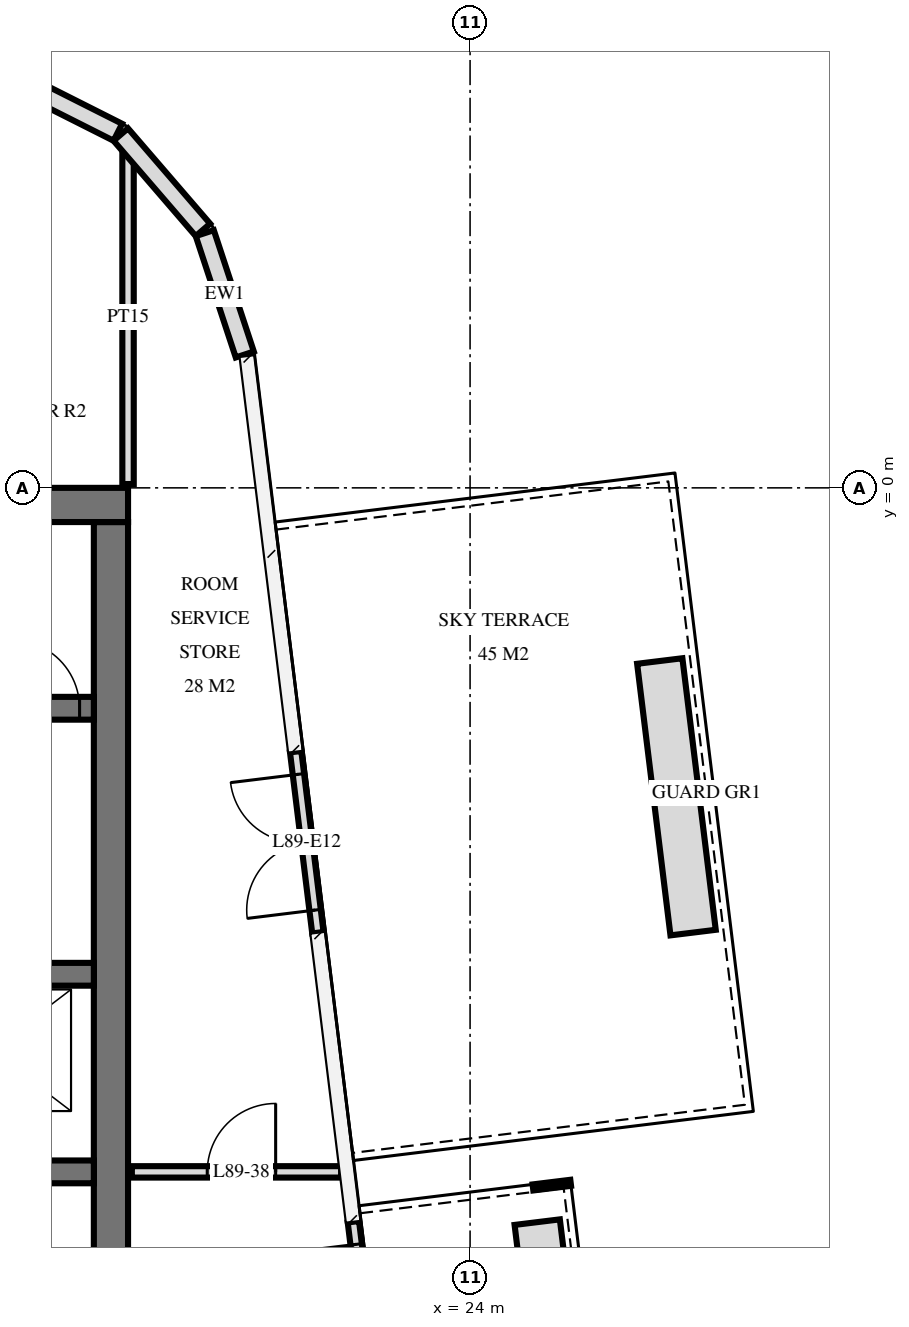
"""IFC4 building model, lengths in metres.
Left out: names, types, materials, properties, quantities, classifications, styles, units other than length and angle.
Written with IfcOpenShell. Run it as: python <this file> out.ifc"""

import sys

from ifc_helpers import new_model, si_unit, direction, frame, frame_2d, origin, place, context, subcontext, project, spatial, rectangle, extrude, element, fill, save


model = new_model("IFC4")
c1 = context("Model", 3, precision=1e-05, world=origin(), true_north=direction((0.0, 1.0)))
c2 = subcontext(c1, "Body", "Model", "MODEL_VIEW")
j1 = project(units=[si_unit("LENGTHUNIT", "METRE"), si_unit("PLANEANGLEUNIT", "RADIAN")], contexts=[c1])
p1 = place(None, origin())
s1 = spatial("IfcSite", under=j1, at=p1, CompositionType="ELEMENT")
p2 = place(p1, origin())
s2 = spatial("IfcBuilding", under=s1, at=p2, CompositionType="ELEMENT")
p3 = place(p2, frame((0.0, 0.0, 338.6)))
s3 = spatial("IfcBuildingStorey", under=s2, at=p3, CompositionType="ELEMENT", Elevation=338.6)
p4 = place(p3, frame((10.0, -0.225, 0.0), z_axis=(0.0, 0.0, 1.0), x_axis=(1.0, 0.0, 0.0)))
e1 = element("IfcWall", 1, at=p4, inside=s3, PredefinedType="SHEAR", context=c2, shape_type="SweptSolid", body=[
    extrude(rectangle(XDim=9.5, YDim=0.45, at=frame_2d((4.75, 0.0))), origin(), (0.0, 0.0, 1.0), 4.0),
])
p5 = place(p3, frame((19.275, -14.55, 0.0), z_axis=(0.0, 0.0, 1.0), x_axis=(0.0, 1.0, 0.0)))
e2 = element("IfcWall", 2, at=p5, inside=s3, PredefinedType="SHEAR", context=c2, shape_type="SweptSolid", body=[
    extrude(rectangle(XDim=14.1, YDim=0.45, at=frame_2d((7.05, 0.0))), origin(), (0.0, 0.0, 1.0), 4.0),
])
p6 = place(p3, frame((10.35, -2.9, 0.0), z_axis=(0.0, 0.0, 1.0), x_axis=(1.0, 0.0, 0.0)))
e3 = element("IfcWall", 3, at=p6, inside=s3, PredefinedType="SHEAR", context=c2, shape_type="SweptSolid", body=[
    extrude(rectangle(XDim=8.7, YDim=0.3, at=frame_2d((4.35, 0.0))), origin(), (0.0, 0.0, 1.0), 4.0),
])
p7 = place(p6, frame((0.8, 0.0, 0.0)))
e4 = element("IfcOpeningElement", 4, at=p7, cuts=e3, PredefinedType="OPENING", context=c2, shape_type="SweptSolid", body=[
    extrude(rectangle(XDim=1.1, YDim=2.1, at=frame_2d((0.55, 1.05))), frame((0.0, 0.16, 0.0), z_axis=(0.0, -1.0, 0.0), x_axis=(1.0, 0.0, 0.0)), (0.0, 0.0, 1.0), 0.32),
])
p8 = place(p6, frame((3.8, 0.0, 0.0)))
e5 = element("IfcOpeningElement", 5, at=p8, cuts=e3, PredefinedType="OPENING", context=c2, shape_type="SweptSolid", body=[
    extrude(rectangle(XDim=1.1, YDim=2.1, at=frame_2d((0.55, 1.05))), frame((0.0, 0.16, 0.0), z_axis=(0.0, -1.0, 0.0), x_axis=(1.0, 0.0, 0.0)), (0.0, 0.0, 1.0), 0.32),
])
p9 = place(p6, frame((6.188, 0.0, 0.0)))
e6 = element("IfcOpeningElement", 6, at=p9, cuts=e3, PredefinedType="OPENING", context=c2, shape_type="SweptSolid", body=[
    extrude(rectangle(XDim=0.9, YDim=2.1, at=frame_2d((0.45, 1.05))), frame((0.0, 0.16, 0.0), z_axis=(0.0, -1.0, 0.0), x_axis=(1.0, 0.0, 0.0)), (0.0, 0.0, 1.0), 0.32),
])
p10 = place(p6, frame((7.613, 0.0, 0.0)))
e7 = element("IfcOpeningElement", 7, at=p10, cuts=e3, PredefinedType="OPENING", context=c2, shape_type="SweptSolid", body=[
    extrude(rectangle(XDim=0.9, YDim=2.1, at=frame_2d((0.45, 1.05))), frame((0.0, 0.16, 0.0), z_axis=(0.0, -1.0, 0.0), x_axis=(1.0, 0.0, 0.0)), (0.0, 0.0, 1.0), 0.32),
])
p11 = place(p3, frame((10.35, -6.4, 0.0), z_axis=(0.0, 0.0, 1.0), x_axis=(1.0, 0.0, 0.0)))
e8 = element("IfcWall", 8, at=p11, inside=s3, PredefinedType="SHEAR", context=c2, shape_type="SweptSolid", body=[
    extrude(rectangle(XDim=8.7, YDim=0.3, at=frame_2d((4.35, 0.0))), origin(), (0.0, 0.0, 1.0), 4.0),
])
p12 = place(p11, frame((0.8, 0.0, 0.0)))
e9 = element("IfcOpeningElement", 9, at=p12, cuts=e8, PredefinedType="OPENING", context=c2, shape_type="SweptSolid", body=[
    extrude(rectangle(XDim=1.1, YDim=2.1, at=frame_2d((0.55, 1.05))), frame((0.0, 0.16, 0.0), z_axis=(0.0, -1.0, 0.0), x_axis=(1.0, 0.0, 0.0)), (0.0, 0.0, 1.0), 0.32),
])
p13 = place(p11, frame((6.8, 0.0, 0.0)))
e10 = element("IfcOpeningElement", 10, at=p13, cuts=e8, PredefinedType="OPENING", context=c2, shape_type="SweptSolid", body=[
    extrude(rectangle(XDim=1.1, YDim=2.1, at=frame_2d((0.55, 1.05))), frame((0.0, 0.16, 0.0), z_axis=(0.0, -1.0, 0.0), x_axis=(1.0, 0.0, 0.0)), (0.0, 0.0, 1.0), 0.32),
])
p14 = place(p3, frame((10.35, -9.0, 0.0), z_axis=(0.0, 0.0, 1.0), x_axis=(1.0, 0.0, 0.0)))
e11 = element("IfcWall", 11, at=p14, inside=s3, PredefinedType="SHEAR", context=c2, shape_type="SweptSolid", body=[
    extrude(rectangle(XDim=8.7, YDim=0.3, at=frame_2d((4.35, 0.0))), origin(), (0.0, 0.0, 1.0), 4.0),
])
p15 = place(p14, frame((3.8, 0.0, 0.0)))
e12 = element("IfcOpeningElement", 12, at=p15, cuts=e11, PredefinedType="OPENING", context=c2, shape_type="SweptSolid", body=[
    extrude(rectangle(XDim=1.1, YDim=2.1, at=frame_2d((0.55, 1.05))), frame((0.0, 0.16, 0.0), z_axis=(0.0, -1.0, 0.0), x_axis=(1.0, 0.0, 0.0)), (0.0, 0.0, 1.0), 0.32),
])
p16 = place(p3, frame((21.036, 1.755, 0.0), z_axis=(0.0, 0.0, 1.0), x_axis=(-0.313046160822, 0.949737911844, 0.0)))
e13 = element("IfcWall", 13, at=p16, inside=s3, PredefinedType="SOLIDWALL", context=c2, shape_type="SweptSolid", body=[
    extrude(rectangle(XDim=1.681, YDim=0.25, at=frame_2d((0.841, 0.0))), origin(), (0.0, 0.0, 1.0), 3.72),
])
for number, where, z_axis, x_axis in (
    (14, (20.485, 3.394, 0.0), (0.0, 0.0, 1.0), (-0.653, 0.758, 0.0)),
    (15, (19.366, 4.679, 0.0), (0.0, 0.0, 1.0), (-0.893, 0.45, 0.0)),
):
    element("IfcWall", number, at=place(p3, frame(where, z_axis=z_axis, x_axis=x_axis)), inside=s3, PredefinedType="SOLIDWALL", context=c2, shape_type="SweptSolid", body=[
        extrude(rectangle(XDim=1.656, YDim=0.25, at=frame_2d((0.828, 0.0))), origin(), (0.0, 0.0, 1.0), 3.72),
    ])
p17 = place(p3, frame((22.757, -12.038, 0.0), z_axis=(0.0, 0.0, 1.0), x_axis=(-0.121868445399, 0.992546261902, 0.0)))
e16 = element("IfcWall", 16, at=p17, inside=s3, PredefinedType="USERDEFINED", context=c2, shape_type="SweptSolid", body=[
    extrude(rectangle(XDim=2.4, YDim=0.15, at=frame_2d((1.2, 0.0))), origin(), (0.0, 0.0, 1.0), 3.72),
])
p18 = place(p17, frame((0.3, 0.0, 0.0)))
e17 = element("IfcOpeningElement", 17, at=p18, cuts=e16, PredefinedType="OPENING", context=c2, shape_type="SweptSolid", body=[
    extrude(rectangle(XDim=1.8, YDim=2.4, at=frame_2d((0.9, 1.2))), frame((0.0, 0.085, 0.0), z_axis=(0.0, -1.0, 0.0), x_axis=(1.0, 0.0, 0.0)), (0.0, 0.0, 1.0), 0.17),
])
p19 = place(p3, frame((21.998, -5.853, 0.0), z_axis=(0.0, 0.0, 1.0), x_axis=(-0.121868445399, 0.992546261902, 0.0)))
e18 = element("IfcWall", 18, at=p19, inside=s3, PredefinedType="USERDEFINED", context=c2, shape_type="SweptSolid", body=[
    extrude(rectangle(XDim=2.4, YDim=0.15, at=frame_2d((1.2, 0.0))), origin(), (0.0, 0.0, 1.0), 3.72),
])
p20 = place(p19, frame((0.3, 0.0, 0.0)))
e19 = element("IfcOpeningElement", 19, at=p20, cuts=e18, PredefinedType="OPENING", context=c2, shape_type="SweptSolid", body=[
    extrude(rectangle(XDim=1.8, YDim=2.4, at=frame_2d((0.9, 1.2))), frame((0.0, 0.085, 0.0), z_axis=(0.0, -1.0, 0.0), x_axis=(1.0, 0.0, 0.0)), (0.0, 0.0, 1.0), 0.17),
])
p21 = place(p3, frame((24.883, -9.662, 0.0), z_axis=(0.0, 0.0, 1.0), x_axis=(0.121830336845, -0.992550940267, 0.0)))
e20 = element("IfcWall", 20, at=p21, inside=s3, PredefinedType="USERDEFINED", context=c2, shape_type="SweptSolid", body=[
    extrude(rectangle(XDim=1.8, YDim=0.6, at=frame_2d((0.9, 0.0))), origin(), (0.0, 0.0, 1.0), 0.65),
])
p22 = place(p3, frame((26.496, -2.278, 0.0), z_axis=(0.0, 0.0, 1.0), x_axis=(0.121864343918, -0.992546765488, 0.0)))
e21 = element("IfcWall", 21, at=p22, inside=s3, PredefinedType="USERDEFINED", context=c2, shape_type="SweptSolid", body=[
    extrude(rectangle(XDim=3.6, YDim=0.6, at=frame_2d((1.8, 0.0))), origin(), (0.0, 0.0, 1.0), 0.65),
])
p23 = place(p3, frame((19.5, 0.05, 0.0), z_axis=(0.0, 0.0, 1.0), x_axis=(0.0, 1.0, 0.0)))
e22 = element("IfcWall", 22, at=p23, inside=s3, PredefinedType="PARTITIONING", context=c2, shape_type="SweptSolid", body=[
    extrude(rectangle(XDim=4.403, YDim=0.15, at=frame_2d((2.202, 0.0))), origin(), (0.0, 0.0, 1.0), 3.72),
])
p24 = place(p3, frame((19.55, -9.0, 0.0), z_axis=(0.0, 0.0, 1.0), x_axis=(1.0, 0.0, 0.0)))
e23 = element("IfcWall", 23, at=p24, inside=s3, PredefinedType="PARTITIONING", context=c2, shape_type="SweptSolid", body=[
    extrude(rectangle(XDim=2.753, YDim=0.15, at=frame_2d((1.377, 0.0))), origin(), (0.0, 0.0, 1.0), 3.72),
])
p25 = place(p24, frame((0.992, 0.0, 0.0)))
e24 = element("IfcOpeningElement", 24, at=p25, cuts=e23, PredefinedType="OPENING", context=c2, shape_type="SweptSolid", body=[
    extrude(rectangle(XDim=0.9, YDim=2.1, at=frame_2d((0.45, 1.05))), frame((0.0, 0.085, 0.0), z_axis=(0.0, -1.0, 0.0), x_axis=(1.0, 0.0, 0.0)), (0.0, 0.0, 1.0), 0.17),
])
p26 = place(p18, origin())
e25 = element("IfcDoor", 25, at=p26, inside=s3, OperationType="DOUBLE_DOOR_SINGLE_SWING", PredefinedType="DOOR", context=c2, shape_type="SweptSolid", body=[
    extrude(rectangle(XDim=1.8, YDim=2.4, at=frame_2d((0.9, 1.2))), frame((0.0, 0.025, 0.0), z_axis=(0.0, -1.0, 0.0), x_axis=(1.0, 0.0, 0.0)), (0.0, 0.0, 1.0), 0.05),
])
fill(e17, e25)
p27 = place(p20, origin())
e26 = element("IfcDoor", 26, at=p27, inside=s3, OperationType="DOUBLE_DOOR_SINGLE_SWING", PredefinedType="DOOR", context=c2, shape_type="SweptSolid", body=[
    extrude(rectangle(XDim=1.8, YDim=2.4, at=frame_2d((0.9, 1.2))), frame((0.0, 0.025, 0.0), z_axis=(0.0, -1.0, 0.0), x_axis=(1.0, 0.0, 0.0)), (0.0, 0.0, 1.0), 0.05),
])
fill(e19, e26)
p28 = place(p10, origin())
e27 = element("IfcDoor", 27, at=p28, inside=s3, OperationType="SINGLE_SWING_RIGHT", PredefinedType="DOOR", context=c2, shape_type="SweptSolid", body=[
    extrude(rectangle(XDim=0.9, YDim=2.1, at=frame_2d((0.45, 1.05))), frame((0.0, 0.025, 0.0), z_axis=(0.0, -1.0, 0.0), x_axis=(1.0, 0.0, 0.0)), (0.0, 0.0, 1.0), 0.05),
])
fill(e7, e27)
p29 = place(p25, origin())
e28 = element("IfcDoor", 28, at=p29, inside=s3, OperationType="SINGLE_SWING_LEFT", PredefinedType="DOOR", context=c2, shape_type="SweptSolid", body=[
    extrude(rectangle(XDim=0.9, YDim=2.1, at=frame_2d((0.45, 1.05))), frame((0.0, 0.025, 0.0), z_axis=(0.0, -1.0, 0.0), x_axis=(1.0, 0.0, 0.0)), (0.0, 0.0, 1.0), 0.05),
])
fill(e24, e28)
save(model, sys.argv[1])
